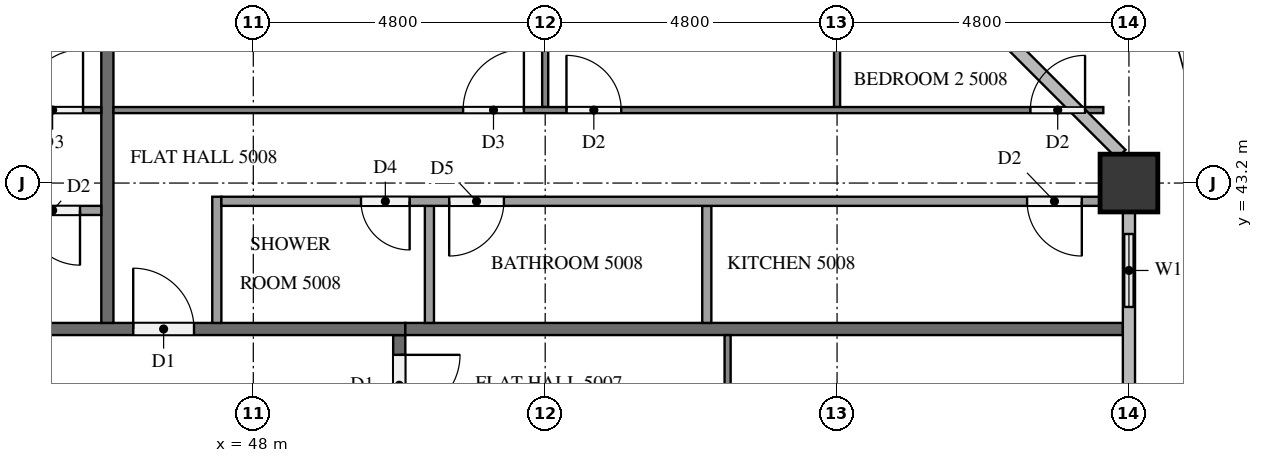
"""IFC4 building model, lengths in metres.
Left out: names, types, materials, properties, quantities, classifications, styles, units other than length and angle.
Written with IfcOpenShell. Run it as: python <this file> out.ifc"""

import sys

from ifc_helpers import new_model, si_unit, direction, frame, frame_2d, origin, origin_2d, place, context, subcontext, project, spatial, rectangle, extrude, element, fill, save


model = new_model("IFC4")
c1 = context("Model", 3, precision=1e-05, world=origin(), true_north=direction((0.0, 1.0)))
c2 = subcontext(c1, "Body", "Model", "MODEL_VIEW")
j1 = project(units=[si_unit("LENGTHUNIT", "METRE"), si_unit("PLANEANGLEUNIT", "RADIAN")], contexts=[c1])
p1 = place(None, origin())
s1 = spatial("IfcSite", under=j1, at=p1, CompositionType="ELEMENT")
p2 = place(p1, origin())
s2 = spatial("IfcBuilding", under=s1, at=p2, CompositionType="ELEMENT")
p3 = place(p2, frame((0.0, 0.0, 192.9)))
s3 = spatial("IfcBuildingStorey", under=s2, at=p3, CompositionType="ELEMENT", Elevation=192.9)
p4 = place(p3, frame((62.4, 43.2, 0.0), z_axis=(0.0, 0.0, 1.0), x_axis=(1.0, 0.0, 0.0)))
e1 = element("IfcColumn", 1, at=p4, inside=s3, PredefinedType="COLUMN", context=c2, shape_type="SweptSolid", body=[
    extrude(rectangle(XDim=0.95, YDim=0.95, at=origin_2d()), origin(), (0.0, 0.0, 1.0), 3.2),
])
p5 = place(p3, frame((62.4, 40.8, 0.0), z_axis=(0.0, 0.0, 1.0), x_axis=(0.0, 1.0, 0.0)))
e2 = element("IfcWall", 2, at=p5, inside=s3, PredefinedType="SOLIDWALL", context=c2, shape_type="SweptSolid", body=[
    extrude(rectangle(XDim=1.925, YDim=0.15, at=frame_2d((0.962, 0.0))), origin(), (0.0, 0.0, 1.0), 3.2),
])
p6 = place(p5, frame((0.363, 0.0, 0.9)))
e3 = element("IfcOpeningElement", 3, at=p6, cuts=e2, PredefinedType="OPENING", context=c2, shape_type="SweptSolid", body=[
    extrude(rectangle(XDim=1.2, YDim=1.4, at=frame_2d((0.6, 0.7))), frame((0.0, 0.085, 0.0), z_axis=(0.0, -1.0, 0.0), x_axis=(1.0, 0.0, 0.0)), (0.0, 0.0, 1.0), 0.17),
])
p7 = place(p3, frame((50.4, 40.7, 0.0), z_axis=(0.0, 0.0, 1.0), x_axis=(0.0, -1.0, 0.0)))
e4 = element("IfcWall", 4, at=p7, inside=s3, PredefinedType="PARTITIONING", context=c2, shape_type="SweptSolid", body=[
    extrude(rectangle(XDim=28.6, YDim=0.2, at=frame_2d((14.3, 0.0))), origin(), (0.0, 0.0, 1.0), 3.2),
])
p8 = place(p7, frame((21.925, 0.0, 0.0)))
e5 = element("IfcOpeningElement", 5, at=p8, cuts=e4, PredefinedType="OPENING", context=c2, shape_type="SweptSolid", body=[
    extrude(rectangle(XDim=1.0, YDim=2.1, at=frame_2d((0.5, 1.05))), frame((0.0, 0.11, 0.0), z_axis=(0.0, -1.0, 0.0), x_axis=(1.0, 0.0, 0.0)), (0.0, 0.0, 1.0), 0.22),
])
p9 = place(p7, frame((20.075, 0.0, 0.0)))
e6 = element("IfcOpeningElement", 6, at=p9, cuts=e4, PredefinedType="OPENING", context=c2, shape_type="SweptSolid", body=[
    extrude(rectangle(XDim=1.0, YDim=2.1, at=frame_2d((0.5, 1.05))), frame((0.0, 0.11, 0.0), z_axis=(0.0, -1.0, 0.0), x_axis=(1.0, 0.0, 0.0)), (0.0, 0.0, 1.0), 0.22),
])
p10 = place(p7, frame((0.325, 0.0, 0.0)))
e7 = element("IfcOpeningElement", 7, at=p10, cuts=e4, PredefinedType="OPENING", context=c2, shape_type="SweptSolid", body=[
    extrude(rectangle(XDim=1.0, YDim=2.1, at=frame_2d((0.5, 1.05))), frame((0.0, 0.11, 0.0), z_axis=(0.0, -1.0, 0.0), x_axis=(1.0, 0.0, 0.0)), (0.0, 0.0, 1.0), 0.22),
])
p11 = place(p3, frame((11.9, 40.8, 0.0), z_axis=(0.0, 0.0, 1.0), x_axis=(1.0, 0.0, 0.0)))
e8 = element("IfcWall", 8, at=p11, inside=s3, PredefinedType="PARTITIONING", context=c2, shape_type="SweptSolid", body=[
    extrude(rectangle(XDim=38.6, YDim=0.2, at=frame_2d((19.3, 0.0))), origin(), (0.0, 0.0, 1.0), 3.2),
])
p12 = place(p11, frame((34.125, 0.0, 0.0)))
e9 = element("IfcOpeningElement", 9, at=p12, cuts=e8, PredefinedType="OPENING", context=c2, shape_type="SweptSolid", body=[
    extrude(rectangle(XDim=1.0, YDim=2.1, at=frame_2d((0.5, 1.05))), frame((0.0, 0.11, 0.0), z_axis=(0.0, -1.0, 0.0), x_axis=(1.0, 0.0, 0.0)), (0.0, 0.0, 1.0), 0.22),
])
p13 = place(p11, frame((24.525, 0.0, 0.0)))
e10 = element("IfcOpeningElement", 10, at=p13, cuts=e8, PredefinedType="OPENING", context=c2, shape_type="SweptSolid", body=[
    extrude(rectangle(XDim=1.0, YDim=2.1, at=frame_2d((0.5, 1.05))), frame((0.0, 0.11, 0.0), z_axis=(0.0, -1.0, 0.0), x_axis=(1.0, 0.0, 0.0)), (0.0, 0.0, 1.0), 0.22),
])
p14 = place(p11, frame((7.725, 0.0, 0.0)))
e11 = element("IfcOpeningElement", 11, at=p14, cuts=e8, PredefinedType="OPENING", context=c2, shape_type="SweptSolid", body=[
    extrude(rectangle(XDim=1.0, YDim=2.1, at=frame_2d((0.5, 1.05))), frame((0.0, 0.11, 0.0), z_axis=(0.0, -1.0, 0.0), x_axis=(1.0, 0.0, 0.0)), (0.0, 0.0, 1.0), 0.22),
])
p15 = place(p11, frame((5.875, 0.0, 0.0)))
e12 = element("IfcOpeningElement", 12, at=p15, cuts=e8, PredefinedType="OPENING", context=c2, shape_type="SweptSolid", body=[
    extrude(rectangle(XDim=1.0, YDim=2.1, at=frame_2d((0.5, 1.05))), frame((0.0, 0.11, 0.0), z_axis=(0.0, -1.0, 0.0), x_axis=(1.0, 0.0, 0.0)), (0.0, 0.0, 1.0), 0.22),
])
p16 = place(p3, frame((50.5, 40.8, 0.0), z_axis=(0.0, 0.0, 1.0), x_axis=(1.0, 0.0, 0.0)))
e13 = element("IfcWall", 13, at=p16, inside=s3, PredefinedType="PARTITIONING", context=c2, shape_type="SweptSolid", body=[
    extrude(rectangle(XDim=11.8, YDim=0.2, at=frame_2d((5.9, 0.0))), origin(), (0.0, 0.0, 1.0), 3.2),
])
p17 = place(p3, frame((45.6, 47.9, 0.0), z_axis=(0.0, 0.0, 1.0), x_axis=(0.0, -1.0, 0.0)))
e14 = element("IfcWall", 14, at=p17, inside=s3, PredefinedType="PARTITIONING", context=c2, shape_type="SweptSolid", body=[
    extrude(rectangle(XDim=7.0, YDim=0.2, at=frame_2d((3.5, 0.0))), origin(), (0.0, 0.0, 1.0), 3.2),
])
p18 = place(p3, frame((55.8, 40.7, 0.0), z_axis=(0.0, 0.0, 1.0), x_axis=(0.0, -1.0, 0.0)))
e15 = element("IfcWall", 15, at=p18, inside=s3, PredefinedType="PARTITIONING", context=c2, shape_type="SweptSolid", body=[
    extrude(rectangle(XDim=14.2, YDim=0.1, at=frame_2d((7.1, 0.0))), origin(), (0.0, 0.0, 1.0), 3.2),
])
p19 = place(p18, frame((3.45, 0.0, 0.0)))
e16 = element("IfcOpeningElement", 16, at=p19, cuts=e15, PredefinedType="OPENING", context=c2, shape_type="SweptSolid", body=[
    extrude(rectangle(XDim=0.9, YDim=2.1, at=frame_2d((0.45, 1.05))), frame((0.0, 0.06, 0.0), z_axis=(0.0, -1.0, 0.0), x_axis=(1.0, 0.0, 0.0)), (0.0, 0.0, 1.0), 0.12),
])
p20 = place(p18, frame((5.05, 0.0, 0.0)))
e17 = element("IfcOpeningElement", 17, at=p20, cuts=e15, PredefinedType="OPENING", context=c2, shape_type="SweptSolid", body=[
    extrude(rectangle(XDim=1.0, YDim=2.1, at=frame_2d((0.5, 1.05))), frame((0.0, 0.06, 0.0), z_axis=(0.0, -1.0, 0.0), x_axis=(1.0, 0.0, 0.0)), (0.0, 0.0, 1.0), 0.12),
])
p21 = place(p18, frame((13.0, 0.0, 0.0)))
e18 = element("IfcOpeningElement", 18, at=p21, cuts=e15, PredefinedType="OPENING", context=c2, shape_type="SweptSolid", body=[
    extrude(rectangle(XDim=0.9, YDim=2.1, at=frame_2d((0.45, 1.05))), frame((0.0, 0.06, 0.0), z_axis=(0.0, -1.0, 0.0), x_axis=(1.0, 0.0, 0.0)), (0.0, 0.0, 1.0), 0.12),
])
p22 = place(p3, frame((52.8, 44.45, 0.0), z_axis=(0.0, 0.0, 1.0), x_axis=(0.0, 1.0, 0.0)))
e19 = element("IfcWall", 19, at=p22, inside=s3, PredefinedType="PARTITIONING", context=c2, shape_type="SweptSolid", body=[
    extrude(rectangle(XDim=3.45, YDim=0.1, at=frame_2d((1.725, 0.0))), origin(), (0.0, 0.0, 1.0), 3.2),
])
p23 = place(p3, frame((57.6, 44.45, 0.0), z_axis=(0.0, 0.0, 1.0), x_axis=(0.0, 1.0, 0.0)))
e20 = element("IfcWall", 20, at=p23, inside=s3, PredefinedType="PARTITIONING", context=c2, shape_type="SweptSolid", body=[
    extrude(rectangle(XDim=3.075, YDim=0.1, at=frame_2d((1.538, 0.0))), origin(), (0.0, 0.0, 1.0), 3.2),
])
p24 = place(p3, frame((45.7, 44.4, 0.0), z_axis=(0.0, 0.0, 1.0), x_axis=(1.0, 0.0, 0.0)))
e21 = element("IfcWall", 21, at=p24, inside=s3, PredefinedType="PARTITIONING", context=c2, shape_type="SweptSolid", body=[
    extrude(rectangle(XDim=16.279, YDim=0.1, at=frame_2d((8.139, 0.0))), origin(), (0.0, 0.0, 1.0), 3.2),
])
p25 = place(p24, frame((5.75, 0.0, 0.0)))
e22 = element("IfcOpeningElement", 22, at=p25, cuts=e21, PredefinedType="OPENING", context=c2, shape_type="SweptSolid", body=[
    extrude(rectangle(XDim=1.0, YDim=2.1, at=frame_2d((0.5, 1.05))), frame((0.0, 0.06, 0.0), z_axis=(0.0, -1.0, 0.0), x_axis=(1.0, 0.0, 0.0)), (0.0, 0.0, 1.0), 0.12),
])
p26 = place(p24, frame((7.45, 0.0, 0.0)))
e23 = element("IfcOpeningElement", 23, at=p26, cuts=e21, PredefinedType="OPENING", context=c2, shape_type="SweptSolid", body=[
    extrude(rectangle(XDim=0.9, YDim=2.1, at=frame_2d((0.45, 1.05))), frame((0.0, 0.06, 0.0), z_axis=(0.0, -1.0, 0.0), x_axis=(1.0, 0.0, 0.0)), (0.0, 0.0, 1.0), 0.12),
])
p27 = place(p24, frame((15.079, 0.0, 0.0)))
e24 = element("IfcOpeningElement", 24, at=p27, cuts=e21, PredefinedType="OPENING", context=c2, shape_type="SweptSolid", body=[
    extrude(rectangle(XDim=0.9, YDim=2.1, at=frame_2d((0.45, 1.05))), frame((0.0, 0.06, 0.0), z_axis=(0.0, -1.0, 0.0), x_axis=(1.0, 0.0, 0.0)), (0.0, 0.0, 1.0), 0.12),
])
for number, where, z_axis, x_axis in (
    (25, (50.896, 40.9, 0.0), (0.0, 0.0, 1.0), (0.0, 1.0, 0.0)),
    (26, (55.458, 40.9, 0.0), (0.0, 0.0, 1.0), (0.0, 1.0, 0.0)),
):
    element("IfcWall", number, at=place(p3, frame(where, z_axis=z_axis, x_axis=x_axis)), inside=s3, PredefinedType="PARTITIONING", context=c2, shape_type="SweptSolid", body=[
        extrude(rectangle(XDim=1.925, YDim=0.15, at=frame_2d((0.962, 0.0))), origin(), (0.0, 0.0, 1.0), 3.2),
    ])
p28 = place(p3, frame((47.4, 40.9, 0.0), z_axis=(0.0, 0.0, 1.0), x_axis=(0.0, 1.0, 0.0)))
e27 = element("IfcWall", 27, at=p28, inside=s3, PredefinedType="PARTITIONING", context=c2, shape_type="SweptSolid", body=[
    extrude(rectangle(XDim=2.075, YDim=0.15, at=frame_2d((1.038, 0.0))), origin(), (0.0, 0.0, 1.0), 3.2),
])
p29 = place(p3, frame((61.925, 42.9, 0.0), z_axis=(0.0, 0.0, 1.0), x_axis=(-1.0, 0.0, 0.0)))
e28 = element("IfcWall", 28, at=p29, inside=s3, PredefinedType="PARTITIONING", context=c2, shape_type="SweptSolid", body=[
    extrude(rectangle(XDim=14.45, YDim=0.15, at=frame_2d((7.225, 0.0))), origin(), (0.0, 0.0, 1.0), 3.2),
])
p30 = place(p29, frame((11.354, 0.0, 0.0)))
e29 = element("IfcOpeningElement", 29, at=p30, cuts=e28, PredefinedType="OPENING", context=c2, shape_type="SweptSolid", body=[
    extrude(rectangle(XDim=0.8, YDim=2.1, at=frame_2d((0.4, 1.05))), frame((0.0, 0.085, 0.0), z_axis=(0.0, -1.0, 0.0), x_axis=(1.0, 0.0, 0.0)), (0.0, 0.0, 1.0), 0.17),
])
p31 = place(p29, frame((9.804, 0.0, 0.0)))
e30 = element("IfcOpeningElement", 30, at=p31, cuts=e28, PredefinedType="OPENING", context=c2, shape_type="SweptSolid", body=[
    extrude(rectangle(XDim=0.9, YDim=2.1, at=frame_2d((0.45, 1.05))), frame((0.0, 0.085, 0.0), z_axis=(0.0, -1.0, 0.0), x_axis=(1.0, 0.0, 0.0)), (0.0, 0.0, 1.0), 0.17),
])
p32 = place(p29, frame((0.3, 0.0, 0.0)))
e31 = element("IfcOpeningElement", 31, at=p32, cuts=e28, PredefinedType="OPENING", context=c2, shape_type="SweptSolid", body=[
    extrude(rectangle(XDim=0.9, YDim=2.1, at=frame_2d((0.45, 1.05))), frame((0.0, 0.085, 0.0), z_axis=(0.0, -1.0, 0.0), x_axis=(1.0, 0.0, 0.0)), (0.0, 0.0, 1.0), 0.17),
])
p33 = place(p3, frame((36.1, 44.4, 0.0), z_axis=(0.0, 0.0, 1.0), x_axis=(1.0, 0.0, 0.0)))
e32 = element("IfcWall", 32, at=p33, inside=s3, PredefinedType="PARTITIONING", context=c2, shape_type="SweptSolid", body=[
    extrude(rectangle(XDim=9.4, YDim=0.1, at=frame_2d((4.7, 0.0))), origin(), (0.0, 0.0, 1.0), 3.2),
])
p34 = place(p33, frame((0.3, 0.0, 0.0)))
e33 = element("IfcOpeningElement", 33, at=p34, cuts=e32, PredefinedType="OPENING", context=c2, shape_type="SweptSolid", body=[
    extrude(rectangle(XDim=0.9, YDim=2.1, at=frame_2d((0.45, 1.05))), frame((0.0, 0.06, 0.0), z_axis=(0.0, -1.0, 0.0), x_axis=(1.0, 0.0, 0.0)), (0.0, 0.0, 1.0), 0.12),
])
p35 = place(p33, frame((8.1, 0.0, 0.0)))
e34 = element("IfcOpeningElement", 34, at=p35, cuts=e32, PredefinedType="OPENING", context=c2, shape_type="SweptSolid", body=[
    extrude(rectangle(XDim=1.0, YDim=2.1, at=frame_2d((0.5, 1.05))), frame((0.0, 0.06, 0.0), z_axis=(0.0, -1.0, 0.0), x_axis=(1.0, 0.0, 0.0)), (0.0, 0.0, 1.0), 0.12),
])
p36 = place(p3, frame((45.5, 42.75, 0.0), z_axis=(0.0, 0.0, 1.0), x_axis=(-1.0, 0.0, 0.0)))
e35 = element("IfcWall", 35, at=p36, inside=s3, PredefinedType="PARTITIONING", context=c2, shape_type="SweptSolid", body=[
    extrude(rectangle(XDim=7.625, YDim=0.15, at=frame_2d((3.812, 0.0))), origin(), (0.0, 0.0, 1.0), 3.2),
])
p37 = place(p36, frame((6.525, 0.0, 0.0)))
e36 = element("IfcOpeningElement", 36, at=p37, cuts=e35, PredefinedType="OPENING", context=c2, shape_type="SweptSolid", body=[
    extrude(rectangle(XDim=0.8, YDim=2.1, at=frame_2d((0.4, 1.05))), frame((0.0, 0.085, 0.0), z_axis=(0.0, -1.0, 0.0), x_axis=(1.0, 0.0, 0.0)), (0.0, 0.0, 1.0), 0.17),
])
p38 = place(p36, frame((0.35, 0.0, 0.0)))
e37 = element("IfcOpeningElement", 37, at=p38, cuts=e35, PredefinedType="OPENING", context=c2, shape_type="SweptSolid", body=[
    extrude(rectangle(XDim=0.9, YDim=2.1, at=frame_2d((0.45, 1.05))), frame((0.0, 0.085, 0.0), z_axis=(0.0, -1.0, 0.0), x_axis=(1.0, 0.0, 0.0)), (0.0, 0.0, 1.0), 0.17),
])
p39 = place(p6, origin())
e38 = element("IfcWindow", 38, at=p39, inside=s3, PartitioningType="SINGLE_PANEL", PredefinedType="WINDOW", context=c2, shape_type="SweptSolid", body=[
    extrude(rectangle(XDim=1.2, YDim=1.4, at=frame_2d((0.6, 0.7))), frame((0.0, 0.03, 0.0), z_axis=(0.0, -1.0, 0.0), x_axis=(1.0, 0.0, 0.0)), (0.0, 0.0, 1.0), 0.06),
])
fill(e3, e38)
p40 = place(p10, origin())
e39 = element("IfcDoor", 39, at=p40, inside=s3, OperationType="SINGLE_SWING_LEFT", PredefinedType="DOOR", context=c2, shape_type="SweptSolid", body=[
    extrude(rectangle(XDim=1.0, YDim=2.1, at=frame_2d((0.5, 1.05))), frame((0.0, 0.025, 0.0), z_axis=(0.0, -1.0, 0.0), x_axis=(1.0, 0.0, 0.0)), (0.0, 0.0, 1.0), 0.05),
])
fill(e7, e39)
p41 = place(p12, origin())
e40 = element("IfcDoor", 40, at=p41, inside=s3, OperationType="SINGLE_SWING_LEFT", PredefinedType="DOOR", context=c2, shape_type="SweptSolid", body=[
    extrude(rectangle(XDim=1.0, YDim=2.1, at=frame_2d((0.5, 1.05))), frame((0.0, 0.025, 0.0), z_axis=(0.0, -1.0, 0.0), x_axis=(1.0, 0.0, 0.0)), (0.0, 0.0, 1.0), 0.05),
])
fill(e9, e40)
p42 = place(p25, origin())
e41 = element("IfcDoor", 41, at=p42, inside=s3, OperationType="SINGLE_SWING_RIGHT", PredefinedType="DOOR", context=c2, shape_type="SweptSolid", body=[
    extrude(rectangle(XDim=1.0, YDim=2.1, at=frame_2d((0.5, 1.05))), frame((0.0, 0.025, 0.0), z_axis=(0.0, -1.0, 0.0), x_axis=(1.0, 0.0, 0.0)), (0.0, 0.0, 1.0), 0.05),
])
fill(e22, e41)
p43 = place(p26, origin())
e42 = element("IfcDoor", 42, at=p43, inside=s3, OperationType="SINGLE_SWING_LEFT", PredefinedType="DOOR", context=c2, shape_type="SweptSolid", body=[
    extrude(rectangle(XDim=0.9, YDim=2.1, at=frame_2d((0.45, 1.05))), frame((0.0, 0.025, 0.0), z_axis=(0.0, -1.0, 0.0), x_axis=(1.0, 0.0, 0.0)), (0.0, 0.0, 1.0), 0.05),
])
fill(e23, e42)
p44 = place(p27, origin())
e43 = element("IfcDoor", 43, at=p44, inside=s3, OperationType="SINGLE_SWING_RIGHT", PredefinedType="DOOR", context=c2, shape_type="SweptSolid", body=[
    extrude(rectangle(XDim=0.9, YDim=2.1, at=frame_2d((0.45, 1.05))), frame((0.0, 0.025, 0.0), z_axis=(0.0, -1.0, 0.0), x_axis=(1.0, 0.0, 0.0)), (0.0, 0.0, 1.0), 0.05),
])
fill(e24, e43)
p45 = place(p30, origin())
e44 = element("IfcDoor", 44, at=p45, inside=s3, OperationType="SINGLE_SWING_LEFT", PredefinedType="DOOR", context=c2, shape_type="SweptSolid", body=[
    extrude(rectangle(XDim=0.8, YDim=2.1, at=frame_2d((0.4, 1.05))), frame((0.0, 0.025, 0.0), z_axis=(0.0, -1.0, 0.0), x_axis=(1.0, 0.0, 0.0)), (0.0, 0.0, 1.0), 0.05),
])
fill(e29, e44)
p46 = place(p31, origin())
e45 = element("IfcDoor", 45, at=p46, inside=s3, OperationType="SINGLE_SWING_RIGHT", PredefinedType="DOOR", context=c2, shape_type="SweptSolid", body=[
    extrude(rectangle(XDim=0.9, YDim=2.1, at=frame_2d((0.45, 1.05))), frame((0.0, 0.025, 0.0), z_axis=(0.0, -1.0, 0.0), x_axis=(1.0, 0.0, 0.0)), (0.0, 0.0, 1.0), 0.05),
])
fill(e30, e45)
p47 = place(p32, origin())
e46 = element("IfcDoor", 46, at=p47, inside=s3, OperationType="SINGLE_SWING_LEFT", PredefinedType="DOOR", context=c2, shape_type="SweptSolid", body=[
    extrude(rectangle(XDim=0.9, YDim=2.1, at=frame_2d((0.45, 1.05))), frame((0.0, 0.025, 0.0), z_axis=(0.0, -1.0, 0.0), x_axis=(1.0, 0.0, 0.0)), (0.0, 0.0, 1.0), 0.05),
])
fill(e31, e46)
p48 = place(p35, origin())
e47 = element("IfcDoor", 47, at=p48, inside=s3, OperationType="SINGLE_SWING_RIGHT", PredefinedType="DOOR", context=c2, shape_type="SweptSolid", body=[
    extrude(rectangle(XDim=1.0, YDim=2.1, at=frame_2d((0.5, 1.05))), frame((0.0, 0.025, 0.0), z_axis=(0.0, -1.0, 0.0), x_axis=(1.0, 0.0, 0.0)), (0.0, 0.0, 1.0), 0.05),
])
fill(e34, e47)
p49 = place(p38, origin())
e48 = element("IfcDoor", 48, at=p49, inside=s3, OperationType="SINGLE_SWING_LEFT", PredefinedType="DOOR", context=c2, shape_type="SweptSolid", body=[
    extrude(rectangle(XDim=0.9, YDim=2.1, at=frame_2d((0.45, 1.05))), frame((0.0, 0.025, 0.0), z_axis=(0.0, -1.0, 0.0), x_axis=(1.0, 0.0, 0.0)), (0.0, 0.0, 1.0), 0.05),
])
fill(e37, e48)
save(model, sys.argv[1])
